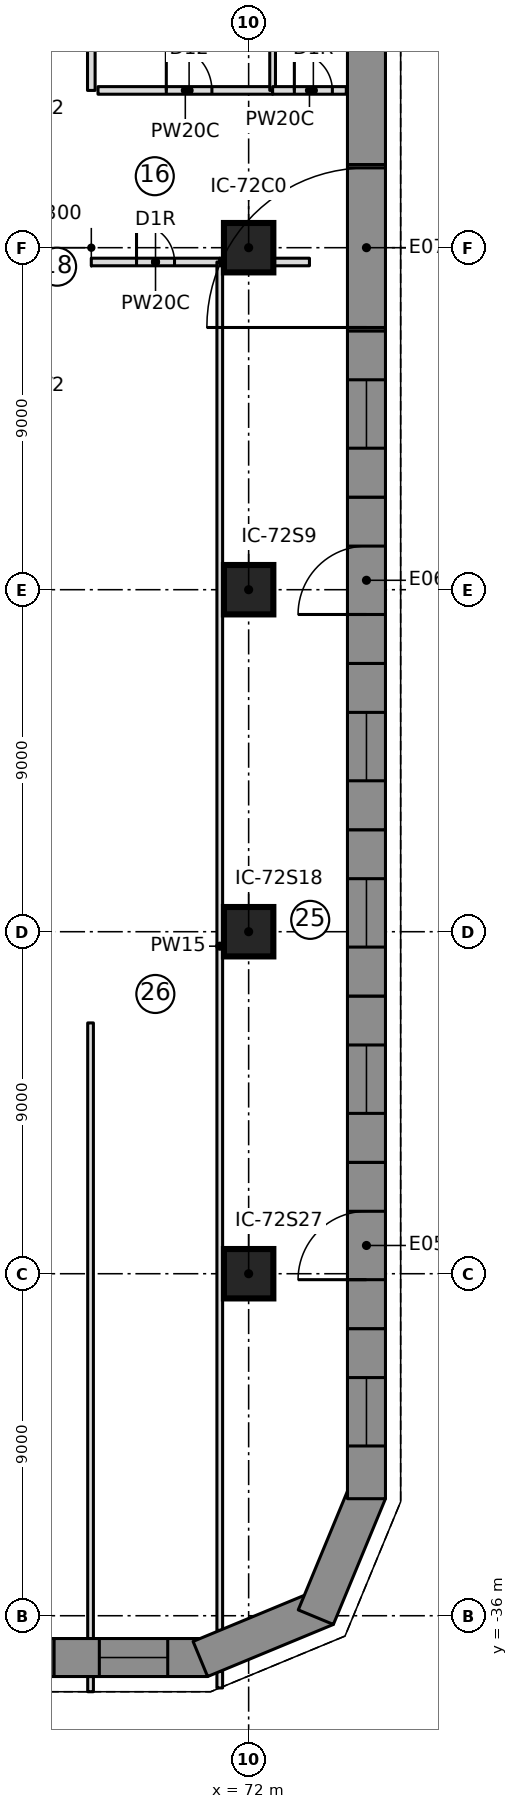
"""IFC4 building model, lengths in metres.
Left out: names, types, materials, properties, quantities, classifications, styles, units other than length and angle.
Written with IfcOpenShell. Run it as: python <this file> out.ifc"""

import sys

from ifc_helpers import new_model, si_unit, direction, frame, frame_2d, origin, origin_2d, place, context, subcontext, project, spatial, polyline, rectangle, outline, extrude, element, fill, save


model = new_model("IFC4")
c1 = context("Model", 3, precision=1e-05, world=origin(), true_north=direction((0.0, 1.0)))
c2 = subcontext(c1, "Body", "Model", "MODEL_VIEW")
j1 = project(units=[si_unit("LENGTHUNIT", "METRE"), si_unit("PLANEANGLEUNIT", "RADIAN")], contexts=[c1])
p1 = place(None, origin())
s1 = spatial("IfcSite", under=j1, at=p1, CompositionType="ELEMENT")
p2 = place(p1, origin())
s2 = spatial("IfcBuilding", under=s1, at=p2, CompositionType="ELEMENT")
p3 = place(p2, origin())
s3 = spatial("IfcBuildingStorey", under=s2, at=p3, CompositionType="ELEMENT", Elevation=0.0)
for number, where, z_axis, x_axis in (
    (1, (72.0, -27.0, 0.0), (0.0, 0.0, 1.0), (1.0, 0.0, 0.0)),
    (2, (72.0, -18.0, 0.0), (0.0, 0.0, 1.0), (1.0, 0.0, 0.0)),
    (3, (72.0, -9.0, 0.0), (0.0, 0.0, 1.0), (1.0, 0.0, 0.0)),
    (4, (72.0, 0.0, 0.0), (0.0, 0.0, 1.0), (1.0, 0.0, 0.0)),
):
    element("IfcColumn", number, at=place(p3, frame(where, z_axis=z_axis, x_axis=x_axis)), inside=s3, PredefinedType="COLUMN", context=c2, shape_type="SweptSolid", body=[
        extrude(rectangle(XDim=1.3, YDim=1.3, at=origin_2d()), origin(), (0.0, 0.0, 1.0), 8.0),
    ])
p4 = place(p3, frame((62.94, -37.1, 0.0), z_axis=(0.0, 0.0, 1.0), x_axis=(1.0, 0.0, 0.0)))
e5 = element("IfcWall", 5, at=p4, inside=s3, PredefinedType="NOTDEFINED", context=c2, shape_type="SweptSolid", body=[
    extrude(outline(polyline([(0.0, -0.5), (3.94, -0.5), (3.94, 0.5), (0.0, 0.5), (0.0, -0.5)])), origin(), (0.0, 0.0, 1.0), 7.7),
])
p5 = place(p4, frame((1.07, 0.0, 0.9)))
e6 = element("IfcOpeningElement", 6, at=p5, cuts=e5, PredefinedType="OPENING", context=c2, shape_type="SweptSolid", body=[
    extrude(rectangle(XDim=1.8, YDim=2.4, at=frame_2d((0.9, 1.2))), frame((0.0, 0.51, 0.0), z_axis=(0.0, -1.0, 0.0), x_axis=(1.0, 0.0, 0.0)), (0.0, 0.0, 1.0), 1.02),
])
p6 = place(p3, frame((66.881, -37.1, 0.0), z_axis=(0.0, 0.0, 1.0), x_axis=(1.0, 0.0, 0.0)))
e7 = element("IfcWall", 7, at=p6, inside=s3, PredefinedType="NOTDEFINED", context=c2, shape_type="SweptSolid", body=[
    extrude(outline(polyline([(0.0, -0.5), (4.04, -0.5), (3.841, 0.5), (0.0, 0.5), (0.0, -0.5)])), origin(), (0.0, 0.0, 1.0), 7.7),
])
p7 = place(p6, frame((1.19, 0.0, 0.9)))
e8 = element("IfcOpeningElement", 8, at=p7, cuts=e7, PredefinedType="OPENING", context=c2, shape_type="SweptSolid", body=[
    extrude(rectangle(XDim=1.8, YDim=2.4, at=frame_2d((0.9, 1.2))), frame((0.0, 0.51, 0.0), z_axis=(0.0, -1.0, 0.0), x_axis=(1.0, 0.0, 0.0)), (0.0, 0.0, 1.0), 1.02),
])
p8 = place(p3, frame((70.821, -37.1, 0.0), z_axis=(0.0, 0.0, 1.0), x_axis=(0.923862365102, 0.382724875529, 0.0)))
e9 = element("IfcWall", 9, at=p8, inside=s3, PredefinedType="NOTDEFINED", context=c2, shape_type="SweptSolid", body=[
    extrude(outline(polyline([(-0.1, -0.5), (3.482, -0.5), (3.068, 0.5), (0.1, 0.5), (-0.1, -0.5)])), origin(), (0.0, 0.0, 1.0), 7.7),
])
p9 = place(p3, frame((73.847, -35.847, 0.0), z_axis=(0.0, 0.0, 1.0), x_axis=(0.382724875529, 0.923862365102, 0.0)))
e10 = element("IfcWall", 10, at=p9, inside=s3, PredefinedType="NOTDEFINED", context=c2, shape_type="SweptSolid", body=[
    extrude(outline(polyline([(-0.207, -0.5), (3.375, -0.5), (3.175, 0.5), (0.207, 0.5), (-0.207, -0.5)])), origin(), (0.0, 0.0, 1.0), 7.7),
])
p10 = place(p3, frame((75.1, -32.821, 0.0), z_axis=(0.0, 0.0, 1.0), x_axis=(0.0, 1.0, 0.0)))
e11 = element("IfcWall", 11, at=p10, inside=s3, PredefinedType="NOTDEFINED", context=c2, shape_type="SweptSolid", body=[
    extrude(outline(polyline([(-0.1, -0.5), (4.376, -0.5), (4.376, 0.5), (0.1, 0.5), (-0.1, -0.5)])), origin(), (0.0, 0.0, 1.0), 7.7),
])
p11 = place(p10, frame((1.288, 0.0, 0.9)))
e12 = element("IfcOpeningElement", 12, at=p11, cuts=e11, PredefinedType="OPENING", context=c2, shape_type="SweptSolid", body=[
    extrude(rectangle(XDim=1.8, YDim=2.4, at=frame_2d((0.9, 1.2))), frame((0.0, 0.51, 0.0), z_axis=(0.0, -1.0, 0.0), x_axis=(1.0, 0.0, 0.0)), (0.0, 0.0, 1.0), 1.02),
])
p12 = place(p3, frame((75.1, -28.445, 0.0), z_axis=(0.0, 0.0, 1.0), x_axis=(0.0, 1.0, 0.0)))
e13 = element("IfcWall", 13, at=p12, inside=s3, PredefinedType="NOTDEFINED", context=c2, shape_type="SweptSolid", body=[
    extrude(outline(polyline([(0.0, -0.5), (4.376, -0.5), (4.376, 0.5), (0.0, 0.5), (0.0, -0.5)])), origin(), (0.0, 0.0, 1.0), 7.7),
])
p13 = place(p12, frame((1.288, 0.0, 0.0)))
e14 = element("IfcOpeningElement", 14, at=p13, cuts=e13, PredefinedType="OPENING", context=c2, shape_type="SweptSolid", body=[
    extrude(rectangle(XDim=1.8, YDim=2.4, at=frame_2d((0.9, 1.2))), frame((0.0, 0.51, 0.0), z_axis=(0.0, -1.0, 0.0), x_axis=(1.0, 0.0, 0.0)), (0.0, 0.0, 1.0), 1.02),
])
p14 = place(p3, frame((75.1, -24.069, 0.0), z_axis=(0.0, 0.0, 1.0), x_axis=(0.0, 1.0, 0.0)))
e15 = element("IfcWall", 15, at=p14, inside=s3, PredefinedType="NOTDEFINED", context=c2, shape_type="SweptSolid", body=[
    extrude(outline(polyline([(0.0, -0.5), (4.376, -0.5), (4.376, 0.5), (0.0, 0.5), (0.0, -0.5)])), origin(), (0.0, 0.0, 1.0), 7.7),
])
p15 = place(p14, frame((1.288, 0.0, 0.9)))
e16 = element("IfcOpeningElement", 16, at=p15, cuts=e15, PredefinedType="OPENING", context=c2, shape_type="SweptSolid", body=[
    extrude(rectangle(XDim=1.8, YDim=2.4, at=frame_2d((0.9, 1.2))), frame((0.0, 0.51, 0.0), z_axis=(0.0, -1.0, 0.0), x_axis=(1.0, 0.0, 0.0)), (0.0, 0.0, 1.0), 1.02),
])
p16 = place(p3, frame((75.1, -19.693, 0.0), z_axis=(0.0, 0.0, 1.0), x_axis=(0.0, 1.0, 0.0)))
e17 = element("IfcWall", 17, at=p16, inside=s3, PredefinedType="NOTDEFINED", context=c2, shape_type="SweptSolid", body=[
    extrude(outline(polyline([(0.0, -0.5), (4.376, -0.5), (4.376, 0.5), (0.0, 0.5), (0.0, -0.5)])), origin(), (0.0, 0.0, 1.0), 7.7),
])
p17 = place(p16, frame((1.288, 0.0, 0.9)))
e18 = element("IfcOpeningElement", 18, at=p17, cuts=e17, PredefinedType="OPENING", context=c2, shape_type="SweptSolid", body=[
    extrude(rectangle(XDim=1.8, YDim=2.4, at=frame_2d((0.9, 1.2))), frame((0.0, 0.51, 0.0), z_axis=(0.0, -1.0, 0.0), x_axis=(1.0, 0.0, 0.0)), (0.0, 0.0, 1.0), 1.02),
])
p18 = place(p3, frame((75.1, -15.316, 0.0), z_axis=(0.0, 0.0, 1.0), x_axis=(0.0, 1.0, 0.0)))
e19 = element("IfcWall", 19, at=p18, inside=s3, PredefinedType="NOTDEFINED", context=c2, shape_type="SweptSolid", body=[
    extrude(outline(polyline([(0.0, -0.5), (4.376, -0.5), (4.376, 0.5), (0.0, 0.5), (0.0, -0.5)])), origin(), (0.0, 0.0, 1.0), 7.7),
])
p19 = place(p18, frame((1.288, 0.0, 0.9)))
e20 = element("IfcOpeningElement", 20, at=p19, cuts=e19, PredefinedType="OPENING", context=c2, shape_type="SweptSolid", body=[
    extrude(rectangle(XDim=1.8, YDim=2.4, at=frame_2d((0.9, 1.2))), frame((0.0, 0.51, 0.0), z_axis=(0.0, -1.0, 0.0), x_axis=(1.0, 0.0, 0.0)), (0.0, 0.0, 1.0), 1.02),
])
p20 = place(p3, frame((75.1, -10.94, 0.0), z_axis=(0.0, 0.0, 1.0), x_axis=(0.0, 1.0, 0.0)))
e21 = element("IfcWall", 21, at=p20, inside=s3, PredefinedType="NOTDEFINED", context=c2, shape_type="SweptSolid", body=[
    extrude(outline(polyline([(0.0, -0.5), (4.376, -0.5), (4.376, 0.5), (0.0, 0.5), (0.0, -0.5)])), origin(), (0.0, 0.0, 1.0), 7.7),
])
p21 = place(p20, frame((1.288, 0.0, 0.0)))
e22 = element("IfcOpeningElement", 22, at=p21, cuts=e21, PredefinedType="OPENING", context=c2, shape_type="SweptSolid", body=[
    extrude(rectangle(XDim=1.8, YDim=2.4, at=frame_2d((0.9, 1.2))), frame((0.0, 0.51, 0.0), z_axis=(0.0, -1.0, 0.0), x_axis=(1.0, 0.0, 0.0)), (0.0, 0.0, 1.0), 1.02),
])
p22 = place(p3, frame((75.1, -6.564, 0.0), z_axis=(0.0, 0.0, 1.0), x_axis=(0.0, 1.0, 0.0)))
e23 = element("IfcWall", 23, at=p22, inside=s3, PredefinedType="NOTDEFINED", context=c2, shape_type="SweptSolid", body=[
    extrude(outline(polyline([(0.0, -0.5), (4.376, -0.5), (4.376, 0.5), (0.0, 0.5), (0.0, -0.5)])), origin(), (0.0, 0.0, 1.0), 7.7),
])
p23 = place(p22, frame((1.288, 0.0, 0.9)))
e24 = element("IfcOpeningElement", 24, at=p23, cuts=e23, PredefinedType="OPENING", context=c2, shape_type="SweptSolid", body=[
    extrude(rectangle(XDim=1.8, YDim=2.4, at=frame_2d((0.9, 1.2))), frame((0.0, 0.51, 0.0), z_axis=(0.0, -1.0, 0.0), x_axis=(1.0, 0.0, 0.0)), (0.0, 0.0, 1.0), 1.02),
])
p24 = place(p3, frame((75.1, -2.188, 0.0), z_axis=(0.0, 0.0, 1.0), x_axis=(0.0, 1.0, 0.0)))
e25 = element("IfcWall", 25, at=p24, inside=s3, PredefinedType="NOTDEFINED", context=c2, shape_type="SweptSolid", body=[
    extrude(outline(polyline([(0.0, -0.5), (4.376, -0.5), (4.376, 0.5), (0.0, 0.5), (0.0, -0.5)])), origin(), (0.0, 0.0, 1.0), 7.7),
])
p25 = place(p24, frame((0.088, 0.0, 0.0)))
e26 = element("IfcOpeningElement", 26, at=p25, cuts=e25, PredefinedType="OPENING", context=c2, shape_type="SweptSolid", body=[
    extrude(rectangle(XDim=4.2, YDim=4.5, at=frame_2d((2.1, 2.25))), frame((0.0, 0.51, 0.0), z_axis=(0.0, -1.0, 0.0), x_axis=(1.0, 0.0, 0.0)), (0.0, 0.0, 1.0), 1.02),
])
p26 = place(p3, frame((75.1, 2.188, 0.0), z_axis=(0.0, 0.0, 1.0), x_axis=(0.0, 1.0, 0.0)))
e27 = element("IfcWall", 27, at=p26, inside=s3, PredefinedType="NOTDEFINED", context=c2, shape_type="SweptSolid", body=[
    extrude(outline(polyline([(0.0, -0.5), (4.376, -0.5), (4.376, 0.5), (0.0, 0.5), (0.0, -0.5)])), origin(), (0.0, 0.0, 1.0), 7.7),
])
p27 = place(p3, frame((67.84, -38.0, 0.0), z_axis=(0.0, 0.0, 1.0), x_axis=(0.0, 1.0, 0.0)))
e28 = element("IfcWall", 28, at=p27, inside=s3, PredefinedType="PARTITIONING", context=c2, shape_type="SweptSolid", body=[
    extrude(rectangle(XDim=0.4, YDim=0.15, at=frame_2d((0.2, 0.0))), origin(), (0.0, 0.0, 1.0), 7.65),
])
p28 = place(p3, frame((67.84, -36.6, 0.0), z_axis=(0.0, 0.0, 1.0), x_axis=(0.0, 1.0, 0.0)))
e29 = element("IfcWall", 29, at=p28, inside=s3, PredefinedType="PARTITIONING", context=c2, shape_type="SweptSolid", body=[
    extrude(rectangle(XDim=16.2, YDim=0.15, at=frame_2d((8.1, 0.0))), origin(), (0.0, 0.0, 1.0), 7.65),
])
p29 = place(p3, frame((67.859, -0.376, 0.0), z_axis=(0.0, 0.0, 1.0), x_axis=(1.0, 0.0, 0.0)))
e30 = element("IfcWall", 30, at=p29, inside=s3, PredefinedType="PARTITIONING", context=c2, shape_type="SweptSolid", body=[
    extrude(rectangle(XDim=3.381, YDim=0.2, at=frame_2d((1.69, 0.0))), origin(), (0.0, 0.0, 1.0), 7.65),
])
p30 = place(p29, frame((1.19, 0.0, 0.0)))
e31 = element("IfcOpeningElement", 31, at=p30, cuts=e30, PredefinedType="OPENING", context=c2, shape_type="SweptSolid", body=[
    extrude(rectangle(XDim=1.0, YDim=2.1, at=frame_2d((0.5, 1.05))), frame((0.0, 0.11, 0.0), z_axis=(0.0, -1.0, 0.0), x_axis=(1.0, 0.0, 0.0)), (0.0, 0.0, 1.0), 0.22),
])
p31 = place(p3, frame((71.24, -37.901, 0.0), z_axis=(0.0, 0.0, 1.0), x_axis=(0.0, 1.0, 0.0)))
e32 = element("IfcWall", 32, at=p31, inside=s3, PredefinedType="PARTITIONING", context=c2, shape_type="SweptSolid", body=[
    extrude(rectangle(XDim=0.433, YDim=0.15, at=frame_2d((0.217, 0.0))), origin(), (0.0, 0.0, 1.0), 7.65),
])
p32 = place(p3, frame((71.24, -36.385, 0.0), z_axis=(0.0, 0.0, 1.0), x_axis=(0.0, 1.0, 0.0)))
e33 = element("IfcWall", 33, at=p32, inside=s3, PredefinedType="PARTITIONING", context=c2, shape_type="SweptSolid", body=[
    extrude(rectangle(XDim=36.009, YDim=0.15, at=frame_2d((18.004, 0.0))), origin(), (0.0, 0.0, 1.0), 7.65),
])
p33 = place(p3, frame((71.24, -0.376, 0.0), z_axis=(0.0, 0.0, 1.0), x_axis=(1.0, 0.0, 0.0)))
e34 = element("IfcWall", 34, at=p33, inside=s3, PredefinedType="PARTITIONING", context=c2, shape_type="SweptSolid", body=[
    extrude(rectangle(XDim=2.36, YDim=0.2, at=frame_2d((1.18, 0.0))), origin(), (0.0, 0.0, 1.0), 7.65),
])
p34 = place(p3, frame((68.036, 4.139, 0.0), z_axis=(0.0, 0.0, 1.0), x_axis=(1.0, 0.0, 0.0)))
e35 = element("IfcWall", 35, at=p34, inside=s3, PredefinedType="PARTITIONING", context=c2, shape_type="SweptSolid", body=[
    extrude(rectangle(XDim=4.595, YDim=0.2, at=frame_2d((2.297, 0.0))), origin(), (0.0, 0.0, 1.0), 7.65),
])
p35 = place(p34, frame((1.797, 0.0, 0.0)))
e36 = element("IfcOpeningElement", 36, at=p35, cuts=e35, PredefinedType="OPENING", context=c2, shape_type="SweptSolid", body=[
    extrude(rectangle(XDim=1.2, YDim=2.1, at=frame_2d((0.6, 1.05))), frame((0.0, 0.11, 0.0), z_axis=(0.0, -1.0, 0.0), x_axis=(1.0, 0.0, 0.0)), (0.0, 0.0, 1.0), 0.22),
])
p36 = place(p3, frame((72.631, 4.139, 0.0), z_axis=(0.0, 0.0, 1.0), x_axis=(0.0, 1.0, 0.0)))
e37 = element("IfcWall", 37, at=p36, inside=s3, PredefinedType="PARTITIONING", context=c2, shape_type="SweptSolid", body=[
    extrude(rectangle(XDim=31.67, YDim=0.15, at=frame_2d((15.835, 0.0))), origin(), (0.0, 0.0, 1.0), 7.65),
])
p37 = place(p3, frame((72.631, 4.139, 0.0), z_axis=(0.0, 0.0, 1.0), x_axis=(1.0, 0.0, 0.0)))
e38 = element("IfcWall", 38, at=p37, inside=s3, PredefinedType="PARTITIONING", context=c2, shape_type="SweptSolid", body=[
    extrude(rectangle(XDim=1.939, YDim=0.2, at=frame_2d((0.97, 0.0))), origin(), (0.0, 0.0, 1.0), 7.65),
])
p38 = place(p37, frame((0.572, 0.0, 0.0)))
e39 = element("IfcOpeningElement", 39, at=p38, cuts=e38, PredefinedType="OPENING", context=c2, shape_type="SweptSolid", body=[
    extrude(rectangle(XDim=1.0, YDim=2.1, at=frame_2d((0.5, 1.05))), frame((0.0, 0.11, 0.0), z_axis=(0.0, -1.0, 0.0), x_axis=(1.0, 0.0, 0.0)), (0.0, 0.0, 1.0), 0.22),
])
p39 = place(p3, frame((67.86, 4.139, 0.0), z_axis=(0.0, 0.0, 1.0), x_axis=(0.0, 1.0, 0.0)))
e40 = element("IfcWall", 40, at=p39, inside=s3, PredefinedType="PARTITIONING", context=c2, shape_type="SweptSolid", body=[
    extrude(rectangle(XDim=16.261, YDim=0.2, at=frame_2d((8.131, 0.0))), origin(), (0.0, 0.0, 1.0), 7.65),
])
p40 = place(p39, frame((7.631, 0.0, 0.0)))
e41 = element("IfcOpeningElement", 41, at=p40, cuts=e40, PredefinedType="OPENING", context=c2, shape_type="SweptSolid", body=[
    extrude(rectangle(XDim=1.0, YDim=2.1, at=frame_2d((0.5, 1.05))), frame((0.0, 0.11, 0.0), z_axis=(0.0, -1.0, 0.0), x_axis=(1.0, 0.0, 0.0)), (0.0, 0.0, 1.0), 0.22),
])
p41 = place(p7, origin())
e42 = element("IfcWindow", 42, at=p41, inside=s3, PartitioningType="SINGLE_PANEL", PredefinedType="WINDOW", context=c2, shape_type="SweptSolid", body=[
    extrude(rectangle(XDim=1.8, YDim=2.4, at=frame_2d((0.9, 1.2))), frame((0.0, 0.5, 0.0), z_axis=(0.0, -1.0, 0.0), x_axis=(1.0, 0.0, 0.0)), (0.0, 0.0, 1.0), 0.06),
])
fill(e8, e42)
p42 = place(p11, origin())
e43 = element("IfcWindow", 43, at=p42, inside=s3, PartitioningType="SINGLE_PANEL", PredefinedType="WINDOW", context=c2, shape_type="SweptSolid", body=[
    extrude(rectangle(XDim=1.8, YDim=2.4, at=frame_2d((0.9, 1.2))), frame((0.0, 0.5, 0.0), z_axis=(0.0, -1.0, 0.0), x_axis=(1.0, 0.0, 0.0)), (0.0, 0.0, 1.0), 0.06),
])
fill(e12, e43)
p43 = place(p13, origin())
e44 = element("IfcDoor", 44, at=p43, inside=s3, OperationType="DOUBLE_DOOR_SINGLE_SWING", PredefinedType="DOOR", context=c2, shape_type="SweptSolid", body=[
    extrude(rectangle(XDim=1.8, YDim=2.4, at=frame_2d((0.9, 1.2))), frame((0.0, 0.495, 0.0), z_axis=(0.0, -1.0, 0.0), x_axis=(1.0, 0.0, 0.0)), (0.0, 0.0, 1.0), 0.05),
])
fill(e14, e44)
p44 = place(p15, origin())
e45 = element("IfcWindow", 45, at=p44, inside=s3, PartitioningType="SINGLE_PANEL", PredefinedType="WINDOW", context=c2, shape_type="SweptSolid", body=[
    extrude(rectangle(XDim=1.8, YDim=2.4, at=frame_2d((0.9, 1.2))), frame((0.0, 0.5, 0.0), z_axis=(0.0, -1.0, 0.0), x_axis=(1.0, 0.0, 0.0)), (0.0, 0.0, 1.0), 0.06),
])
fill(e16, e45)
p45 = place(p17, origin())
e46 = element("IfcWindow", 46, at=p45, inside=s3, PartitioningType="SINGLE_PANEL", PredefinedType="WINDOW", context=c2, shape_type="SweptSolid", body=[
    extrude(rectangle(XDim=1.8, YDim=2.4, at=frame_2d((0.9, 1.2))), frame((0.0, 0.5, 0.0), z_axis=(0.0, -1.0, 0.0), x_axis=(1.0, 0.0, 0.0)), (0.0, 0.0, 1.0), 0.06),
])
fill(e18, e46)
p46 = place(p19, origin())
e47 = element("IfcWindow", 47, at=p46, inside=s3, PartitioningType="SINGLE_PANEL", PredefinedType="WINDOW", context=c2, shape_type="SweptSolid", body=[
    extrude(rectangle(XDim=1.8, YDim=2.4, at=frame_2d((0.9, 1.2))), frame((0.0, 0.5, 0.0), z_axis=(0.0, -1.0, 0.0), x_axis=(1.0, 0.0, 0.0)), (0.0, 0.0, 1.0), 0.06),
])
fill(e20, e47)
p47 = place(p21, origin())
e48 = element("IfcDoor", 48, at=p47, inside=s3, OperationType="DOUBLE_DOOR_SINGLE_SWING", PredefinedType="DOOR", context=c2, shape_type="SweptSolid", body=[
    extrude(rectangle(XDim=1.8, YDim=2.4, at=frame_2d((0.9, 1.2))), frame((0.0, 0.495, 0.0), z_axis=(0.0, -1.0, 0.0), x_axis=(1.0, 0.0, 0.0)), (0.0, 0.0, 1.0), 0.05),
])
fill(e22, e48)
p48 = place(p23, origin())
e49 = element("IfcWindow", 49, at=p48, inside=s3, PartitioningType="SINGLE_PANEL", PredefinedType="WINDOW", context=c2, shape_type="SweptSolid", body=[
    extrude(rectangle(XDim=1.8, YDim=2.4, at=frame_2d((0.9, 1.2))), frame((0.0, 0.5, 0.0), z_axis=(0.0, -1.0, 0.0), x_axis=(1.0, 0.0, 0.0)), (0.0, 0.0, 1.0), 0.06),
])
fill(e24, e49)
p49 = place(p25, origin())
e50 = element("IfcDoor", 50, at=p49, inside=s3, OperationType="ROLLINGUP", PredefinedType="DOOR", context=c2, shape_type="SweptSolid", body=[
    extrude(rectangle(XDim=4.2, YDim=4.5, at=frame_2d((2.1, 2.25))), frame((0.0, 0.025, 0.0), z_axis=(0.0, -1.0, 0.0), x_axis=(1.0, 0.0, 0.0)), (0.0, 0.0, 1.0), 0.05),
])
fill(e26, e50)
p50 = place(p30, origin())
e51 = element("IfcDoor", 51, at=p50, inside=s3, OperationType="SINGLE_SWING_RIGHT", PredefinedType="DOOR", context=c2, shape_type="SweptSolid", body=[
    extrude(rectangle(XDim=1.0, YDim=2.1, at=frame_2d((0.5, 1.05))), frame((0.0, 0.025, 0.0), z_axis=(0.0, -1.0, 0.0), x_axis=(1.0, 0.0, 0.0)), (0.0, 0.0, 1.0), 0.05),
])
fill(e31, e51)
p51 = place(p35, origin())
e52 = element("IfcDoor", 52, at=p51, inside=s3, OperationType="SINGLE_SWING_RIGHT", PredefinedType="DOOR", context=c2, shape_type="SweptSolid", body=[
    extrude(rectangle(XDim=1.2, YDim=2.1, at=frame_2d((0.6, 1.05))), frame((0.0, 0.025, 0.0), z_axis=(0.0, -1.0, 0.0), x_axis=(1.0, 0.0, 0.0)), (0.0, 0.0, 1.0), 0.05),
])
fill(e36, e52)
p52 = place(p38, origin())
e53 = element("IfcDoor", 53, at=p52, inside=s3, OperationType="SINGLE_SWING_RIGHT", PredefinedType="DOOR", context=c2, shape_type="SweptSolid", body=[
    extrude(rectangle(XDim=1.0, YDim=2.1, at=frame_2d((0.5, 1.05))), frame((0.0, 0.025, 0.0), z_axis=(0.0, -1.0, 0.0), x_axis=(1.0, 0.0, 0.0)), (0.0, 0.0, 1.0), 0.05),
])
fill(e39, e53)
save(model, sys.argv[1])
